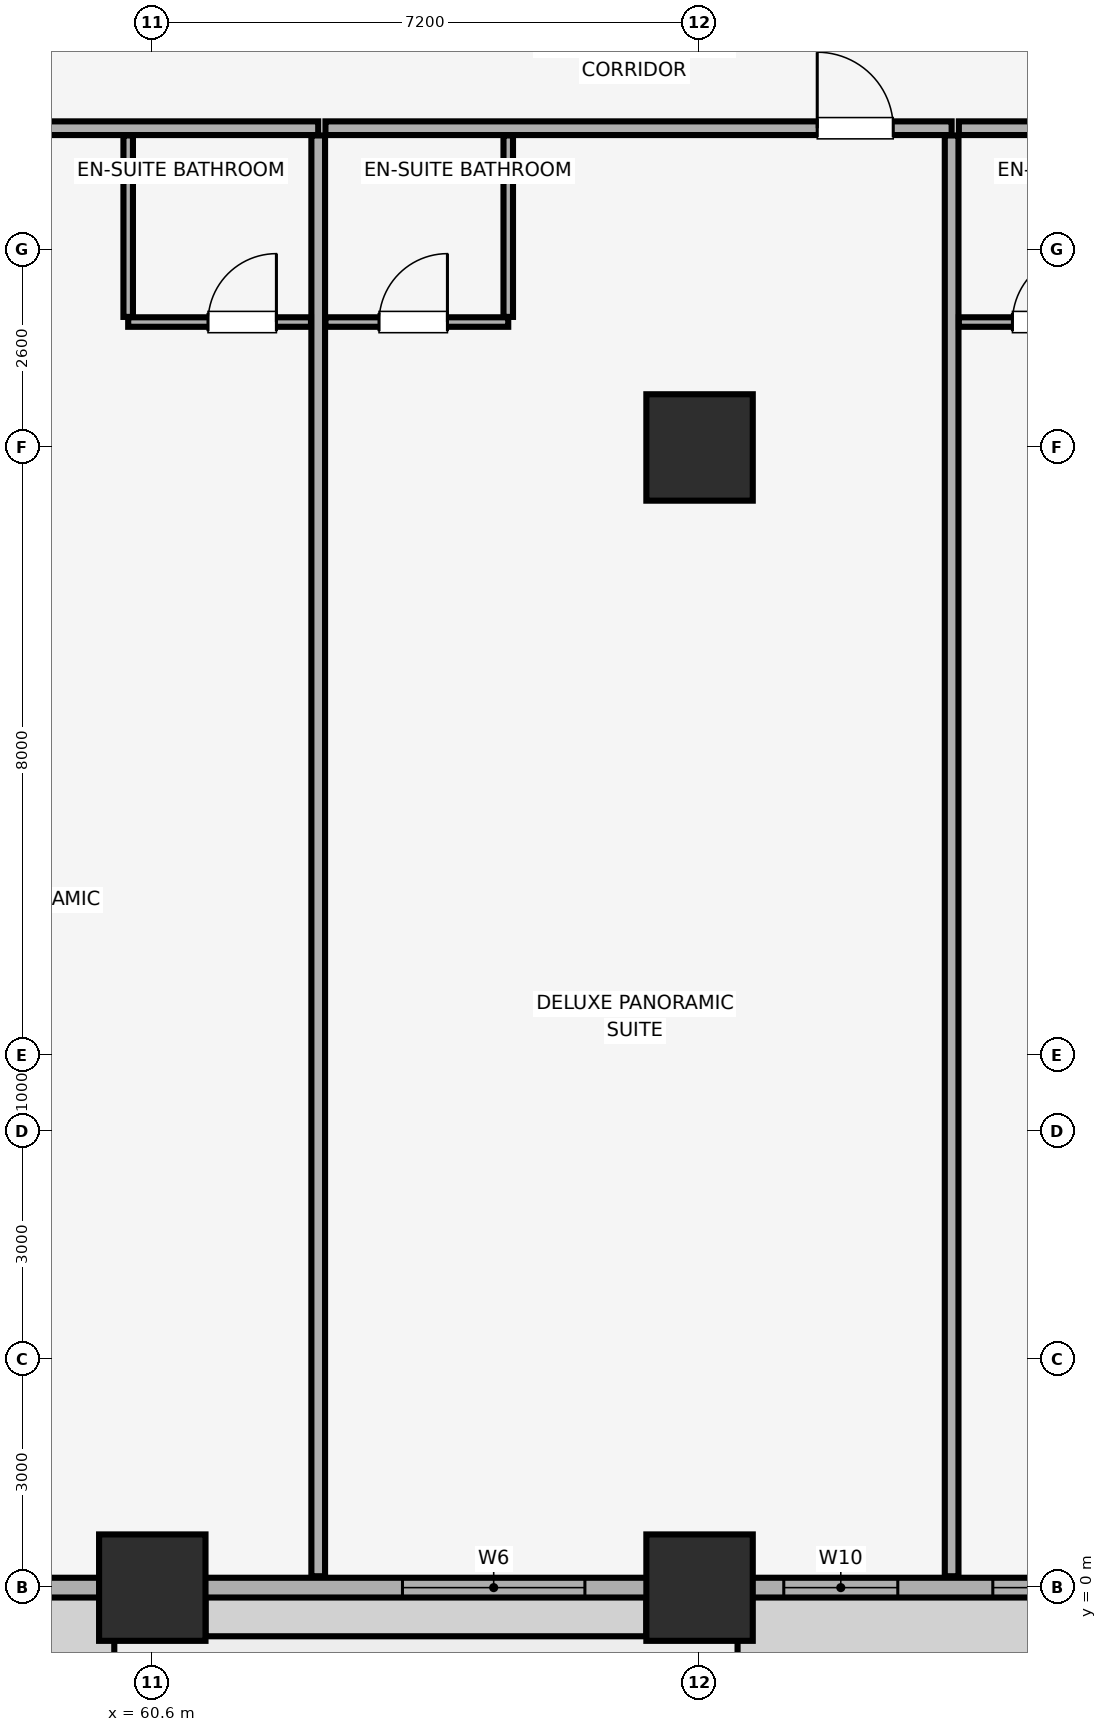
"""IFC4 building model, lengths in metres.
Left out: names, types, materials, properties, quantities, classifications, styles, units other than length and angle.
Written with IfcOpenShell. Run it as: python <this file> out.ifc"""

import sys

from ifc_helpers import new_model, si_unit, direction, frame, frame_2d, origin, origin_2d, place, context, subcontext, project, spatial, rectangle, extrude, element, fill, save


model = new_model("IFC4")
c1 = context("Model", 3, precision=1e-05, world=origin(), true_north=direction((0.0, 1.0)))
c2 = subcontext(c1, "Body", "Model", "MODEL_VIEW")
j1 = project(units=[si_unit("LENGTHUNIT", "METRE"), si_unit("PLANEANGLEUNIT", "RADIAN")], contexts=[c1])
p1 = place(None, origin())
s1 = spatial("IfcSite", under=j1, at=p1, CompositionType="ELEMENT")
p2 = place(p1, origin())
s2 = spatial("IfcBuilding", under=s1, at=p2, CompositionType="ELEMENT")
p3 = place(p2, frame((0.0, 0.0, 72.65)))
s3 = spatial("IfcBuildingStorey", under=s2, at=p3, CompositionType="ELEMENT", Elevation=72.65)
for number, where, z_axis, x_axis in (
    (1, (60.6, 0.0, 0.0), (0.0, 0.0, 1.0), (1.0, 0.0, 0.0)),
    (2, (67.8, 0.0, 0.0), (0.0, 0.0, 1.0), (1.0, 0.0, 0.0)),
    (3, (67.8, 15.0, 0.0), (0.0, 0.0, 1.0), (1.0, 0.0, 0.0)),
):
    element("IfcColumn", number, at=place(p3, frame(where, z_axis=z_axis, x_axis=x_axis)), inside=s3, PredefinedType="COLUMN", context=c2, shape_type="SweptSolid", body=[
        extrude(rectangle(XDim=1.4, YDim=1.4, at=origin_2d()), origin(), (0.0, 0.0, 1.0), 3.51),
    ])
p4 = place(p3, frame((4.2, 0.0, 0.0), z_axis=(0.0, 0.0, 1.0), x_axis=(1.0, 0.0, 0.0)))
e4 = element("IfcWall", 4, at=p4, inside=s3, PredefinedType="SOLIDWALL", context=c2, shape_type="SweptSolid", body=[
    extrude(rectangle(XDim=75.6, YDim=0.26, at=frame_2d((37.8, 0.0))), origin(), (0.0, 0.0, 1.0), 2.56),
])
p5 = place(p4, frame((21.383, 0.0, 0.0)))
e5 = element("IfcOpeningElement", 5, at=p5, cuts=e4, PredefinedType="OPENING", context=c2, shape_type="SweptSolid", body=[
    extrude(rectangle(XDim=1.1, YDim=2.15, at=frame_2d((0.55, 1.075))), frame((0.0, 0.14, 0.0), z_axis=(0.0, -1.0, 0.0), x_axis=(1.0, 0.0, 0.0)), (0.0, 0.0, 1.0), 0.28),
])
p6 = place(p4, frame((37.25, 0.0, 0.0)))
e6 = element("IfcOpeningElement", 6, at=p6, cuts=e4, PredefinedType="OPENING", context=c2, shape_type="SweptSolid", body=[
    extrude(rectangle(XDim=1.1, YDim=2.15, at=frame_2d((0.55, 1.075))), frame((0.0, 0.14, 0.0), z_axis=(0.0, -1.0, 0.0), x_axis=(1.0, 0.0, 0.0)), (0.0, 0.0, 1.0), 0.28),
])
p7 = place(p4, frame((53.117, 0.0, 0.0)))
e7 = element("IfcOpeningElement", 7, at=p7, cuts=e4, PredefinedType="OPENING", context=c2, shape_type="SweptSolid", body=[
    extrude(rectangle(XDim=1.1, YDim=2.15, at=frame_2d((0.55, 1.075))), frame((0.0, 0.14, 0.0), z_axis=(0.0, -1.0, 0.0), x_axis=(1.0, 0.0, 0.0)), (0.0, 0.0, 1.0), 0.28),
])
p8 = place(p4, frame((1.035, 0.0, 0.85)))
e8 = element("IfcOpeningElement", 8, at=p8, cuts=e4, PredefinedType="OPENING", context=c2, shape_type="SweptSolid", body=[
    extrude(rectangle(XDim=2.4, YDim=1.5, at=frame_2d((1.2, 0.75))), frame((0.0, 0.14, 0.0), z_axis=(0.0, -1.0, 0.0), x_axis=(1.0, 0.0, 0.0)), (0.0, 0.0, 1.0), 0.28),
])
p9 = place(p4, frame((5.691, 0.0, 0.85)))
e9 = element("IfcOpeningElement", 9, at=p9, cuts=e4, PredefinedType="OPENING", context=c2, shape_type="SweptSolid", body=[
    extrude(rectangle(XDim=2.4, YDim=1.5, at=frame_2d((1.2, 0.75))), frame((0.0, 0.14, 0.0), z_axis=(0.0, -1.0, 0.0), x_axis=(1.0, 0.0, 0.0)), (0.0, 0.0, 1.0), 0.28),
])
p10 = place(p4, frame((9.342, 0.0, 0.85)))
e10 = element("IfcOpeningElement", 10, at=p10, cuts=e4, PredefinedType="OPENING", context=c2, shape_type="SweptSolid", body=[
    extrude(rectangle(XDim=1.5, YDim=1.4, at=frame_2d((0.75, 0.7))), frame((0.0, 0.14, 0.0), z_axis=(0.0, -1.0, 0.0), x_axis=(1.0, 0.0, 0.0)), (0.0, 0.0, 1.0), 0.28),
])
p11 = place(p4, frame((13.458, 0.0, 0.85)))
e11 = element("IfcOpeningElement", 11, at=p11, cuts=e4, PredefinedType="OPENING", context=c2, shape_type="SweptSolid", body=[
    extrude(rectangle(XDim=2.4, YDim=1.5, at=frame_2d((1.2, 0.75))), frame((0.0, 0.14, 0.0), z_axis=(0.0, -1.0, 0.0), x_axis=(1.0, 0.0, 0.0)), (0.0, 0.0, 1.0), 0.28),
])
p12 = place(p4, frame((23.202, 0.0, 0.85)))
e12 = element("IfcOpeningElement", 12, at=p12, cuts=e4, PredefinedType="OPENING", context=c2, shape_type="SweptSolid", body=[
    extrude(rectangle(XDim=1.5, YDim=1.4, at=frame_2d((0.75, 0.7))), frame((0.0, 0.14, 0.0), z_axis=(0.0, -1.0, 0.0), x_axis=(1.0, 0.0, 0.0)), (0.0, 0.0, 1.0), 0.28),
])
p13 = place(p4, frame((28.8, 0.0, 0.85)))
e13 = element("IfcOpeningElement", 13, at=p13, cuts=e4, PredefinedType="OPENING", context=c2, shape_type="SweptSolid", body=[
    extrude(rectangle(XDim=2.4, YDim=1.5, at=frame_2d((1.2, 0.75))), frame((0.0, 0.14, 0.0), z_axis=(0.0, -1.0, 0.0), x_axis=(1.0, 0.0, 0.0)), (0.0, 0.0, 1.0), 0.28),
])
p14 = place(p4, frame((34.79, 0.0, 0.85)))
e14 = element("IfcOpeningElement", 14, at=p14, cuts=e4, PredefinedType="OPENING", context=c2, shape_type="SweptSolid", body=[
    extrude(rectangle(XDim=1.5, YDim=1.4, at=frame_2d((0.75, 0.7))), frame((0.0, 0.14, 0.0), z_axis=(0.0, -1.0, 0.0), x_axis=(1.0, 0.0, 0.0)), (0.0, 0.0, 1.0), 0.28),
])
p15 = place(p4, frame((39.31, 0.0, 0.85)))
e15 = element("IfcOpeningElement", 15, at=p15, cuts=e4, PredefinedType="OPENING", context=c2, shape_type="SweptSolid", body=[
    extrude(rectangle(XDim=1.5, YDim=1.4, at=frame_2d((0.75, 0.7))), frame((0.0, 0.14, 0.0), z_axis=(0.0, -1.0, 0.0), x_axis=(1.0, 0.0, 0.0)), (0.0, 0.0, 1.0), 0.28),
])
p16 = place(p4, frame((44.4, 0.0, 0.85)))
e16 = element("IfcOpeningElement", 16, at=p16, cuts=e4, PredefinedType="OPENING", context=c2, shape_type="SweptSolid", body=[
    extrude(rectangle(XDim=2.4, YDim=1.5, at=frame_2d((1.2, 0.75))), frame((0.0, 0.14, 0.0), z_axis=(0.0, -1.0, 0.0), x_axis=(1.0, 0.0, 0.0)), (0.0, 0.0, 1.0), 0.28),
])
p17 = place(p4, frame((50.848, 0.0, 0.85)))
e17 = element("IfcOpeningElement", 17, at=p17, cuts=e4, PredefinedType="OPENING", context=c2, shape_type="SweptSolid", body=[
    extrude(rectangle(XDim=1.5, YDim=1.4, at=frame_2d((0.75, 0.7))), frame((0.0, 0.14, 0.0), z_axis=(0.0, -1.0, 0.0), x_axis=(1.0, 0.0, 0.0)), (0.0, 0.0, 1.0), 0.28),
])
p18 = place(p4, frame((59.691, 0.0, 0.85)))
e18 = element("IfcOpeningElement", 18, at=p18, cuts=e4, PredefinedType="OPENING", context=c2, shape_type="SweptSolid", body=[
    extrude(rectangle(XDim=2.4, YDim=1.5, at=frame_2d((1.2, 0.75))), frame((0.0, 0.14, 0.0), z_axis=(0.0, -1.0, 0.0), x_axis=(1.0, 0.0, 0.0)), (0.0, 0.0, 1.0), 0.28),
])
p19 = place(p4, frame((64.708, 0.0, 0.85)))
e19 = element("IfcOpeningElement", 19, at=p19, cuts=e4, PredefinedType="OPENING", context=c2, shape_type="SweptSolid", body=[
    extrude(rectangle(XDim=1.5, YDim=1.4, at=frame_2d((0.75, 0.7))), frame((0.0, 0.14, 0.0), z_axis=(0.0, -1.0, 0.0), x_axis=(1.0, 0.0, 0.0)), (0.0, 0.0, 1.0), 0.28),
])
p20 = place(p4, frame((67.458, 0.0, 0.85)))
e20 = element("IfcOpeningElement", 20, at=p20, cuts=e4, PredefinedType="OPENING", context=c2, shape_type="SweptSolid", body=[
    extrude(rectangle(XDim=2.4, YDim=1.5, at=frame_2d((1.2, 0.75))), frame((0.0, 0.14, 0.0), z_axis=(0.0, -1.0, 0.0), x_axis=(1.0, 0.0, 0.0)), (0.0, 0.0, 1.0), 0.28),
])
p21 = place(p4, frame((72.165, 0.0, 0.85)))
e21 = element("IfcOpeningElement", 21, at=p21, cuts=e4, PredefinedType="OPENING", context=c2, shape_type="SweptSolid", body=[
    extrude(rectangle(XDim=2.4, YDim=1.5, at=frame_2d((1.2, 0.75))), frame((0.0, 0.14, 0.0), z_axis=(0.0, -1.0, 0.0), x_axis=(1.0, 0.0, 0.0)), (0.0, 0.0, 1.0), 0.28),
])
p22 = place(p3, frame((54.545, 19.2, 0.0), z_axis=(0.0, 0.0, 1.0), x_axis=(1.0, 0.0, 0.0)))
e22 = element("IfcWall", 22, at=p22, inside=s3, PredefinedType="PARTITIONING", context=c2, shape_type="SweptSolid", body=[
    extrude(rectangle(XDim=8.238, YDim=0.18, at=frame_2d((4.119, 0.0))), origin(), (0.0, 0.0, 1.0), 3.51),
])
p23 = place(p22, frame((1.872, 0.0, 0.0)))
e23 = element("IfcOpeningElement", 23, at=p23, cuts=e22, PredefinedType="OPENING", context=c2, shape_type="SweptSolid", body=[
    extrude(rectangle(XDim=1.0, YDim=2.15, at=frame_2d((0.5, 1.075))), frame((0.0, 0.1, 0.0), z_axis=(0.0, -1.0, 0.0), x_axis=(1.0, 0.0, 0.0)), (0.0, 0.0, 1.0), 0.2),
])
p24 = place(p3, frame((62.783, 0.15, 0.0), z_axis=(0.0, 0.0, 1.0), x_axis=(0.0, 1.0, 0.0)))
e24 = element("IfcWall", 24, at=p24, inside=s3, PredefinedType="PARTITIONING", context=c2, shape_type="SweptSolid", body=[
    extrude(rectangle(XDim=18.955, YDim=0.18, at=frame_2d((9.478, 0.0))), origin(), (0.0, 0.0, 1.0), 3.51),
])
p25 = place(p3, frame((60.283, 16.65, 0.0), z_axis=(0.0, 0.0, 1.0), x_axis=(1.0, 0.0, 0.0)))
e25 = element("IfcWall", 25, at=p25, inside=s3, PredefinedType="PARTITIONING", context=c2, shape_type="SweptSolid", body=[
    extrude(rectangle(XDim=2.405, YDim=0.125, at=frame_2d((1.203, 0.0))), origin(), (0.0, 0.0, 1.0), 3.51),
])
p26 = place(p25, frame((1.05, 0.0, 0.0)))
e26 = element("IfcOpeningElement", 26, at=p26, cuts=e25, PredefinedType="OPENING", context=c2, shape_type="SweptSolid", body=[
    extrude(rectangle(XDim=0.9, YDim=2.1, at=frame_2d((0.45, 1.05))), frame((0.0, 0.073, 0.0), z_axis=(0.0, -1.0, 0.0), x_axis=(1.0, 0.0, 0.0)), (0.0, 0.0, 1.0), 0.145),
])
p27 = place(p3, frame((60.283, 16.718, 0.0), z_axis=(0.0, 0.0, 1.0), x_axis=(0.0, 1.0, 0.0)))
e27 = element("IfcWall", 27, at=p27, inside=s3, PredefinedType="PARTITIONING", context=c2, shape_type="SweptSolid", body=[
    extrude(rectangle(XDim=2.387, YDim=0.125, at=frame_2d((1.194, 0.0))), origin(), (0.0, 0.0, 1.0), 3.51),
])
p28 = place(p3, frame((62.878, 19.2, 0.0), z_axis=(0.0, 0.0, 1.0), x_axis=(1.0, 0.0, 0.0)))
e28 = element("IfcWall", 28, at=p28, inside=s3, PredefinedType="PARTITIONING", context=c2, shape_type="SweptSolid", body=[
    extrude(rectangle(XDim=8.238, YDim=0.18, at=frame_2d((4.119, 0.0))), origin(), (0.0, 0.0, 1.0), 3.51),
])
p29 = place(p28, frame((6.47, 0.0, 0.0)))
e29 = element("IfcOpeningElement", 29, at=p29, cuts=e28, PredefinedType="OPENING", context=c2, shape_type="SweptSolid", body=[
    extrude(rectangle(XDim=1.0, YDim=2.15, at=frame_2d((0.5, 1.075))), frame((0.0, 0.1, 0.0), z_axis=(0.0, -1.0, 0.0), x_axis=(1.0, 0.0, 0.0)), (0.0, 0.0, 1.0), 0.2),
])
p30 = place(p3, frame((71.116, 0.15, 0.0), z_axis=(0.0, 0.0, 1.0), x_axis=(0.0, 1.0, 0.0)))
e30 = element("IfcWall", 30, at=p30, inside=s3, PredefinedType="PARTITIONING", context=c2, shape_type="SweptSolid", body=[
    extrude(rectangle(XDim=18.955, YDim=0.18, at=frame_2d((9.478, 0.0))), origin(), (0.0, 0.0, 1.0), 2.898),
])
p31 = place(p3, frame((62.878, 16.65, 0.0), z_axis=(0.0, 0.0, 1.0), x_axis=(1.0, 0.0, 0.0)))
e31 = element("IfcWall", 31, at=p31, inside=s3, PredefinedType="PARTITIONING", context=c2, shape_type="SweptSolid", body=[
    extrude(rectangle(XDim=2.405, YDim=0.125, at=frame_2d((1.203, 0.0))), origin(), (0.0, 0.0, 1.0), 3.51),
])
p32 = place(p31, frame((0.705, 0.0, 0.0)))
e32 = element("IfcOpeningElement", 32, at=p32, cuts=e31, PredefinedType="OPENING", context=c2, shape_type="SweptSolid", body=[
    extrude(rectangle(XDim=0.9, YDim=2.1, at=frame_2d((0.45, 1.05))), frame((0.0, 0.073, 0.0), z_axis=(0.0, -1.0, 0.0), x_axis=(1.0, 0.0, 0.0)), (0.0, 0.0, 1.0), 0.145),
])
p33 = place(p3, frame((65.283, 16.718, 0.0), z_axis=(0.0, 0.0, 1.0), x_axis=(0.0, 1.0, 0.0)))
e33 = element("IfcWall", 33, at=p33, inside=s3, PredefinedType="PARTITIONING", context=c2, shape_type="SweptSolid", body=[
    extrude(rectangle(XDim=2.387, YDim=0.125, at=frame_2d((1.194, 0.0))), origin(), (0.0, 0.0, 1.0), 3.51),
])
p34 = place(p3, frame((71.211, 19.2, 0.0), z_axis=(0.0, 0.0, 1.0), x_axis=(1.0, 0.0, 0.0)))
e34 = element("IfcWall", 34, at=p34, inside=s3, PredefinedType="PARTITIONING", context=c2, shape_type="SweptSolid", body=[
    extrude(rectangle(XDim=12.639, YDim=0.18, at=frame_2d((6.319, 0.0))), origin(), (0.0, 0.0, 1.0), 3.51),
])
p35 = place(p34, frame((5.954, 0.0, 0.0)))
e35 = element("IfcOpeningElement", 35, at=p35, cuts=e34, PredefinedType="OPENING", context=c2, shape_type="SweptSolid", body=[
    extrude(rectangle(XDim=1.0, YDim=2.15, at=frame_2d((0.5, 1.075))), frame((0.0, 0.1, 0.0), z_axis=(0.0, -1.0, 0.0), x_axis=(1.0, 0.0, 0.0)), (0.0, 0.0, 1.0), 0.2),
])
p36 = place(p3, frame((71.211, 16.65, 0.0), z_axis=(0.0, 0.0, 1.0), x_axis=(1.0, 0.0, 0.0)))
e36 = element("IfcWall", 36, at=p36, inside=s3, PredefinedType="PARTITIONING", context=c2, shape_type="SweptSolid", body=[
    extrude(rectangle(XDim=2.405, YDim=0.125, at=frame_2d((1.203, 0.0))), origin(), (0.0, 0.0, 1.0), 3.51),
])
p37 = place(p36, frame((0.705, 0.0, 0.0)))
e37 = element("IfcOpeningElement", 37, at=p37, cuts=e36, PredefinedType="OPENING", context=c2, shape_type="SweptSolid", body=[
    extrude(rectangle(XDim=0.9, YDim=2.1, at=frame_2d((0.45, 1.05))), frame((0.0, 0.073, 0.0), z_axis=(0.0, -1.0, 0.0), x_axis=(1.0, 0.0, 0.0)), (0.0, 0.0, 1.0), 0.145),
])
p38 = place(p18, origin())
e38 = element("IfcWindow", 38, at=p38, inside=s3, PartitioningType="SINGLE_PANEL", PredefinedType="WINDOW", context=c2, shape_type="SweptSolid", body=[
    extrude(rectangle(XDim=2.4, YDim=1.5, at=frame_2d((1.2, 0.75))), frame((0.0, 0.03, 0.0), z_axis=(0.0, -1.0, 0.0), x_axis=(1.0, 0.0, 0.0)), (0.0, 0.0, 1.0), 0.06),
])
fill(e18, e38)
p39 = place(p19, origin())
e39 = element("IfcWindow", 39, at=p39, inside=s3, PartitioningType="SINGLE_PANEL", PredefinedType="WINDOW", context=c2, shape_type="SweptSolid", body=[
    extrude(rectangle(XDim=1.5, YDim=1.4, at=frame_2d((0.75, 0.7))), frame((0.0, 0.03, 0.0), z_axis=(0.0, -1.0, 0.0), x_axis=(1.0, 0.0, 0.0)), (0.0, 0.0, 1.0), 0.06),
])
fill(e19, e39)
p40 = place(p20, origin())
e40 = element("IfcWindow", 40, at=p40, inside=s3, PartitioningType="SINGLE_PANEL", PredefinedType="WINDOW", context=c2, shape_type="SweptSolid", body=[
    extrude(rectangle(XDim=2.4, YDim=1.5, at=frame_2d((1.2, 0.75))), frame((0.0, 0.03, 0.0), z_axis=(0.0, -1.0, 0.0), x_axis=(1.0, 0.0, 0.0)), (0.0, 0.0, 1.0), 0.06),
])
fill(e20, e40)
p41 = place(p26, origin())
e41 = element("IfcDoor", 41, at=p41, inside=s3, OperationType="SINGLE_SWING_RIGHT", PredefinedType="DOOR", context=c2, shape_type="SweptSolid", body=[
    extrude(rectangle(XDim=0.9, YDim=2.1, at=frame_2d((0.45, 1.05))), frame((0.0, 0.025, 0.0), z_axis=(0.0, -1.0, 0.0), x_axis=(1.0, 0.0, 0.0)), (0.0, 0.0, 1.0), 0.05),
])
fill(e26, e41)
p42 = place(p29, origin())
e42 = element("IfcDoor", 42, at=p42, inside=s3, OperationType="SINGLE_SWING_LEFT", PredefinedType="DOOR", context=c2, shape_type="SweptSolid", body=[
    extrude(rectangle(XDim=1.0, YDim=2.15, at=frame_2d((0.5, 1.075))), frame((0.0, 0.025, 0.0), z_axis=(0.0, -1.0, 0.0), x_axis=(1.0, 0.0, 0.0)), (0.0, 0.0, 1.0), 0.05),
])
fill(e29, e42)
p43 = place(p32, origin())
e43 = element("IfcDoor", 43, at=p43, inside=s3, OperationType="SINGLE_SWING_RIGHT", PredefinedType="DOOR", context=c2, shape_type="SweptSolid", body=[
    extrude(rectangle(XDim=0.9, YDim=2.1, at=frame_2d((0.45, 1.05))), frame((0.0, 0.025, 0.0), z_axis=(0.0, -1.0, 0.0), x_axis=(1.0, 0.0, 0.0)), (0.0, 0.0, 1.0), 0.05),
])
fill(e32, e43)
p44 = place(p37, origin())
e44 = element("IfcDoor", 44, at=p44, inside=s3, OperationType="SINGLE_SWING_RIGHT", PredefinedType="DOOR", context=c2, shape_type="SweptSolid", body=[
    extrude(rectangle(XDim=0.9, YDim=2.1, at=frame_2d((0.45, 1.05))), frame((0.0, 0.025, 0.0), z_axis=(0.0, -1.0, 0.0), x_axis=(1.0, 0.0, 0.0)), (0.0, 0.0, 1.0), 0.05),
])
fill(e37, e44)
save(model, sys.argv[1])
